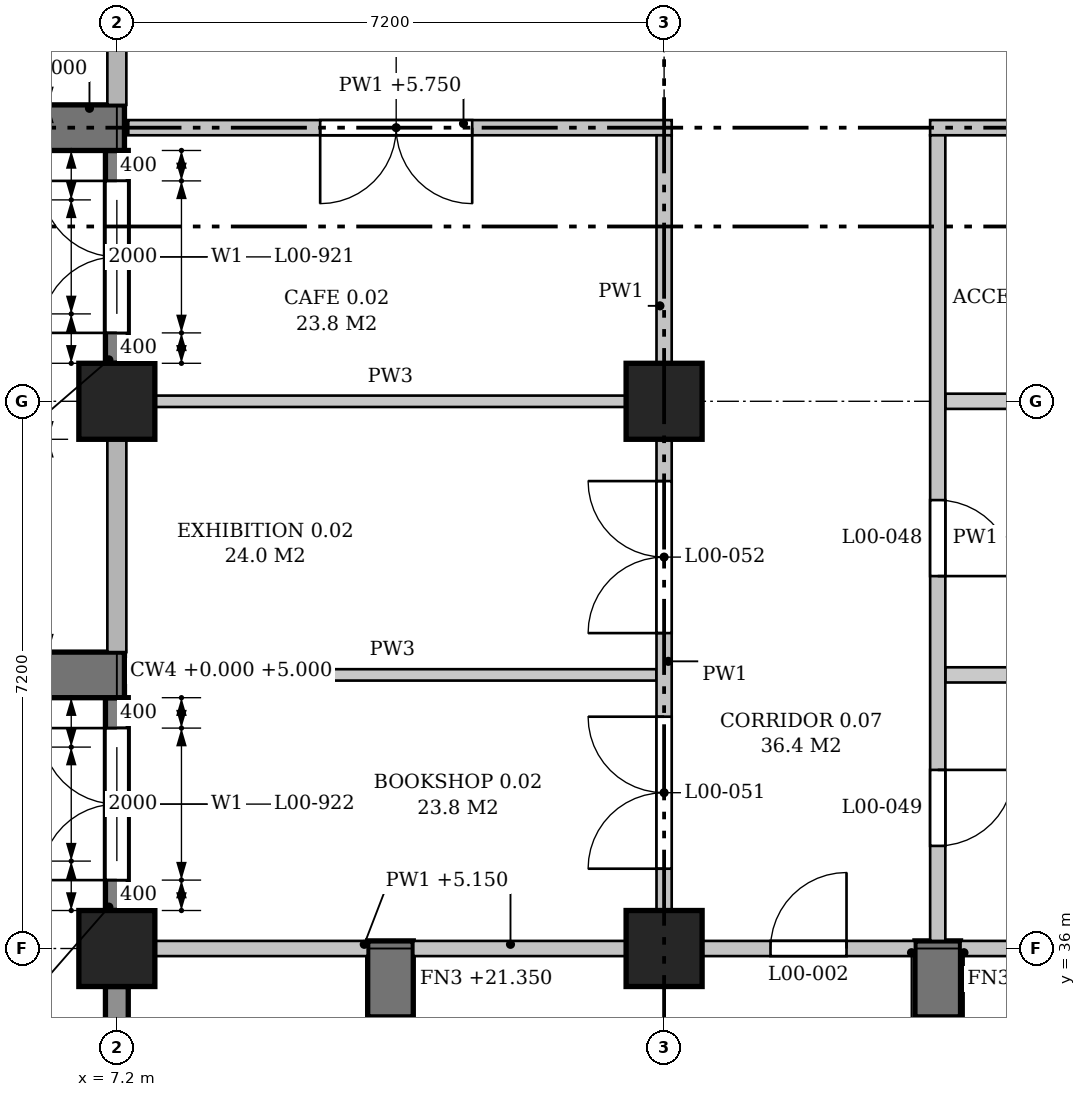
"""IFC4 building model, lengths in metres.
Left out: names, types, materials, properties, quantities, classifications, styles, units other than length and angle.
Written with IfcOpenShell. Run it as: python <this file> out.ifc"""

import sys

from ifc_helpers import new_model, si_unit, direction, frame, frame_2d, origin, origin_2d, place, context, subcontext, project, spatial, polyline, rectangle, outline, extrude, element, fill, save


model = new_model("IFC4")
c1 = context("Model", 3, precision=1e-05, world=origin(), true_north=direction((0.0, 1.0)))
c2 = subcontext(c1, "Body", "Model", "MODEL_VIEW")
j1 = project(units=[si_unit("LENGTHUNIT", "METRE"), si_unit("PLANEANGLEUNIT", "RADIAN")], contexts=[c1])
p1 = place(None, origin())
s1 = spatial("IfcSite", under=j1, at=p1, CompositionType="ELEMENT")
p2 = place(p1, origin())
s2 = spatial("IfcBuilding", under=s1, at=p2, CompositionType="ELEMENT")
p3 = place(p2, origin())
s3 = spatial("IfcBuildingStorey", under=s2, at=p3, CompositionType="ELEMENT", Elevation=0.0)
for number, where, z_axis, x_axis in (
    (1, (7.2, 36.0, 0.0), (0.0, 0.0, 1.0), (1.0, 0.0, 0.0)),
    (2, (7.2, 43.2, 0.0), (0.0, 0.0, 1.0), (1.0, 0.0, 0.0)),
    (3, (14.4, 36.0, 0.0), (0.0, 0.0, 1.0), (1.0, 0.0, 0.0)),
    (4, (14.4, 43.2, 0.0), (0.0, 0.0, 1.0), (1.0, 0.0, 0.0)),
):
    element("IfcColumn", number, at=place(p3, frame(where, z_axis=z_axis, x_axis=x_axis)), inside=s3, PredefinedType="COLUMN", context=c2, shape_type="SweptSolid", body=[
        extrude(rectangle(XDim=1.0, YDim=1.0, at=origin_2d()), origin(), (0.0, 0.0, 1.0), 6.0),
    ])
p4 = place(p3, frame((7.2, 36.5, 0.0), z_axis=(0.0, 0.0, 1.0), x_axis=(0.0, 1.0, 0.0)))
e5 = element("IfcWall", 5, at=p4, inside=s3, PredefinedType="STANDARD", context=c2, shape_type="SweptSolid", body=[
    extrude(rectangle(XDim=2.8, YDim=0.3, at=frame_2d((1.4, 0.0))), origin(), (0.0, 0.0, 1.0), 5.0),
])
p5 = place(p4, frame((0.4, 0.0, 0.0)))
e6 = element("IfcOpeningElement", 6, at=p5, cuts=e5, PredefinedType="OPENING", context=c2, shape_type="SweptSolid", body=[
    extrude(outline(polyline([(0.0, 0.0), (2.0, 0.0), (2.0, 1.9), (1.0, 2.9), (0.0, 1.9), (0.0, 0.0)])), frame((0.0, 0.16, 0.0), z_axis=(0.0, -1.0, 0.0), x_axis=(1.0, 0.0, 0.0)), (0.0, 0.0, 1.0), 0.32),
])
p6 = place(p4, frame((0.65, 0.0, 3.15)))
e7 = element("IfcOpeningElement", 7, at=p6, cuts=e5, PredefinedType="OPENING", context=c2, shape_type="SweptSolid", body=[
    extrude(outline(polyline([(0.0, 0.0), (1.5, 0.0), (1.5, 1.05), (0.75, 1.8), (0.0, 1.05), (0.0, 0.0)])), frame((0.0, 0.16, 0.0), z_axis=(0.0, -1.0, 0.0), x_axis=(1.0, 0.0, 0.0)), (0.0, 0.0, 1.0), 0.32),
])
p7 = place(p3, frame((7.2, 43.7, 0.0), z_axis=(0.0, 0.0, 1.0), x_axis=(0.0, 1.0, 0.0)))
e8 = element("IfcWall", 8, at=p7, inside=s3, PredefinedType="STANDARD", context=c2, shape_type="SweptSolid", body=[
    extrude(rectangle(XDim=2.8, YDim=0.3, at=frame_2d((1.4, 0.0))), origin(), (0.0, 0.0, 1.0), 5.0),
])
p8 = place(p7, frame((0.4, 0.0, 0.0)))
e9 = element("IfcOpeningElement", 9, at=p8, cuts=e8, PredefinedType="OPENING", context=c2, shape_type="SweptSolid", body=[
    extrude(outline(polyline([(0.0, 0.0), (2.0, 0.0), (2.0, 1.9), (1.0, 2.9), (0.0, 1.9), (0.0, 0.0)])), frame((0.0, 0.16, 0.0), z_axis=(0.0, -1.0, 0.0), x_axis=(1.0, 0.0, 0.0)), (0.0, 0.0, 1.0), 0.32),
])
p9 = place(p7, frame((0.65, 0.0, 3.15)))
e10 = element("IfcOpeningElement", 10, at=p9, cuts=e8, PredefinedType="OPENING", context=c2, shape_type="SweptSolid", body=[
    extrude(outline(polyline([(0.0, 0.0), (1.5, 0.0), (1.5, 1.05), (0.75, 1.8), (0.0, 1.05), (0.0, 0.0)])), frame((0.0, 0.16, 0.0), z_axis=(0.0, -1.0, 0.0), x_axis=(1.0, 0.0, 0.0)), (0.0, 0.0, 1.0), 0.32),
])
p10 = place(p3, frame((7.2, 32.7, 0.0), z_axis=(0.0, 0.0, 1.0), x_axis=(0.0, 1.0, 0.0)))
e11 = element("IfcWall", 11, at=p10, inside=s3, PredefinedType="SOLIDWALL", context=c2, shape_type="SweptSolid", body=[
    extrude(rectangle(XDim=2.8, YDim=0.3, at=frame_2d((1.4, 0.0))), origin(), (0.0, 0.0, 1.0), 5.75),
])
for number, where, z_axis, x_axis in (
    (12, (10.8, 36.1, 0.0), (0.0, 0.0, 1.0), (0.0, -1.0, 0.0)),
    (13, (18.0, 36.1, 0.0), (0.0, 0.0, 1.0), (0.0, -1.0, 0.0)),
):
    element("IfcWall", number, at=place(p3, frame(where, z_axis=z_axis, x_axis=x_axis)), inside=s3, PredefinedType="POLYGONAL", context=c2, shape_type="SweptSolid", body=[
        extrude(outline(polyline([(1.0, 0.0), (1.0, 20.975), (0.75, 21.35), (0.35, 21.35), (0.35, 20.75), (0.0, 20.75), (0.0, 16.8), (0.35, 16.8), (0.35, 15.95), (0.0, 15.95), (0.0, 11.4), (0.35, 11.4), (0.35, 10.55), (0.0, 10.55), (0.0, 6.0), (0.35, 6.0), (0.35, 0.0), (1.0, 0.0)])), frame((0.0, 0.3, 0.0), z_axis=(0.0, -1.0, 0.0), x_axis=(1.0, 0.0, 0.0)), (0.0, 0.0, 1.0), 0.6),
    ])
for number, where, z_axis, x_axis in (
    (14, (7.3, 39.6, 0.0), (0.0, 0.0, 1.0), (-1.0, 0.0, 0.0)),
    (15, (7.3, 46.8, 0.0), (0.0, 0.0, 1.0), (-1.0, 0.0, 0.0)),
):
    element("IfcWall", number, at=place(p3, frame(where, z_axis=z_axis, x_axis=x_axis)), inside=s3, PredefinedType="POLYGONAL", context=c2, shape_type="SweptSolid", body=[
        extrude(outline(polyline([(1.0, 0.0), (1.0, 5.25), (0.5, 6.0), (0.35, 6.0), (0.35, 5.0), (0.0, 5.0), (0.0, 0.0), (1.0, 0.0)])), frame((0.0, 0.3, 0.0), z_axis=(0.0, -1.0, 0.0), x_axis=(1.0, 0.0, 0.0)), (0.0, 0.0, 1.0), 0.6),
    ])
p11 = place(p3, frame((7.7, 36.0, 0.0), z_axis=(0.0, 0.0, 1.0), x_axis=(1.0, 0.0, 0.0)))
e16 = element("IfcWall", 16, at=p11, inside=s3, PredefinedType="PARTITIONING", context=c2, shape_type="SweptSolid", body=[
    extrude(rectangle(XDim=2.8, YDim=0.2, at=frame_2d((1.4, 0.0))), origin(), (0.0, 0.0, 1.0), 5.15),
])
p12 = place(p3, frame((11.1, 36.0, 0.0), z_axis=(0.0, 0.0, 1.0), x_axis=(1.0, 0.0, 0.0)))
e17 = element("IfcWall", 17, at=p12, inside=s3, PredefinedType="PARTITIONING", context=c2, shape_type="SweptSolid", body=[
    extrude(rectangle(XDim=2.8, YDim=0.2, at=frame_2d((1.4, 0.0))), origin(), (0.0, 0.0, 1.0), 5.15),
])
p13 = place(p3, frame((14.9, 36.0, 0.0), z_axis=(0.0, 0.0, 1.0), x_axis=(1.0, 0.0, 0.0)))
e18 = element("IfcWall", 18, at=p13, inside=s3, PredefinedType="PARTITIONING", context=c2, shape_type="SweptSolid", body=[
    extrude(rectangle(XDim=2.8, YDim=0.2, at=frame_2d((1.4, 0.0))), origin(), (0.0, 0.0, 1.0), 5.15),
])
p14 = place(p13, frame((0.9, 0.0, 0.0)))
e19 = element("IfcOpeningElement", 19, at=p14, cuts=e18, PredefinedType="OPENING", context=c2, shape_type="SweptSolid", body=[
    extrude(rectangle(XDim=1.0, YDim=2.1, at=frame_2d((0.5, 1.05))), frame((0.0, 0.11, 0.0), z_axis=(0.0, -1.0, 0.0), x_axis=(1.0, 0.0, 0.0)), (0.0, 0.0, 1.0), 0.22),
])
p15 = place(p3, frame((18.3, 36.0, 0.0), z_axis=(0.0, 0.0, 1.0), x_axis=(1.0, 0.0, 0.0)))
e20 = element("IfcWall", 20, at=p15, inside=s3, PredefinedType="PARTITIONING", context=c2, shape_type="SweptSolid", body=[
    extrude(rectangle(XDim=2.8, YDim=0.2, at=frame_2d((1.4, 0.0))), origin(), (0.0, 0.0, 1.0), 5.15),
])
p16 = place(p3, frame((7.35, 39.6, 0.0), z_axis=(0.0, 0.0, 1.0), x_axis=(1.0, 0.0, 0.0)))
e21 = element("IfcWall", 21, at=p16, inside=s3, PredefinedType="PARTITIONING", context=c2, shape_type="SweptSolid", body=[
    extrude(rectangle(XDim=6.95, YDim=0.15, at=frame_2d((3.475, 0.0))), origin(), (0.0, 0.0, 1.0), 5.0),
])
p17 = place(p3, frame((18.1, 39.6, 0.0), z_axis=(0.0, 0.0, 1.0), x_axis=(1.0, 0.0, 0.0)))
e22 = element("IfcWall", 22, at=p17, inside=s3, PredefinedType="PARTITIONING", context=c2, shape_type="SweptSolid", body=[
    extrude(outline(polyline([(0.0, 0.0), (3.4, 0.0), (3.4, 5.0), (3.25, 5.0), (3.25, 5.75), (0.0, 5.75), (0.0, 0.0)])), frame((0.0, 0.1, 0.0), z_axis=(0.0, -1.0, 0.0), x_axis=(1.0, 0.0, 0.0)), (0.0, 0.0, 1.0), 0.2),
])
p18 = place(p3, frame((7.7, 43.2, 0.0), z_axis=(0.0, 0.0, 1.0), x_axis=(1.0, 0.0, 0.0)))
e23 = element("IfcWall", 23, at=p18, inside=s3, PredefinedType="PARTITIONING", context=c2, shape_type="SweptSolid", body=[
    extrude(rectangle(XDim=6.2, YDim=0.15, at=frame_2d((3.1, 0.0))), origin(), (0.0, 0.0, 1.0), 5.0),
])
p19 = place(p3, frame((18.1, 43.2, 0.0), z_axis=(0.0, 0.0, 1.0), x_axis=(1.0, 0.0, 0.0)))
e24 = element("IfcWall", 24, at=p19, inside=s3, PredefinedType="PARTITIONING", context=c2, shape_type="SweptSolid", body=[
    extrude(rectangle(XDim=3.0, YDim=0.2, at=frame_2d((1.5, 0.0))), origin(), (0.0, 0.0, 1.0), 5.0),
])
p20 = place(p3, frame((7.35, 46.8, 0.0), z_axis=(0.0, 0.0, 1.0), x_axis=(1.0, 0.0, 0.0)))
e25 = element("IfcWall", 25, at=p20, inside=s3, PredefinedType="PARTITIONING", context=c2, shape_type="SweptSolid", body=[
    extrude(outline(polyline([(0.0, 0.0), (7.15, 0.0), (7.15, 5.0), (6.8, 5.0), (6.8, 5.75), (0.1, 5.75), (0.1, 5.0), (0.0, 5.0), (0.0, 0.0)])), frame((0.0, 0.1, 0.0), z_axis=(0.0, -1.0, 0.0), x_axis=(1.0, 0.0, 0.0)), (0.0, 0.0, 1.0), 0.2),
])
p21 = place(p20, frame((2.525, 0.0, 0.0)))
e26 = element("IfcOpeningElement", 26, at=p21, cuts=e25, PredefinedType="OPENING", context=c2, shape_type="SweptSolid", body=[
    extrude(rectangle(XDim=2.0, YDim=2.1, at=frame_2d((1.0, 1.05))), frame((0.0, 0.11, 0.0), z_axis=(0.0, -1.0, 0.0), x_axis=(1.0, 0.0, 0.0)), (0.0, 0.0, 1.0), 0.22),
])
p22 = place(p3, frame((17.9, 46.8, 0.0), z_axis=(0.0, 0.0, 1.0), x_axis=(1.0, 0.0, 0.0)))
e27 = element("IfcWall", 27, at=p22, inside=s3, PredefinedType="PARTITIONING", context=c2, shape_type="SweptSolid", body=[
    extrude(outline(polyline([(0.0, 0.0), (3.575, 0.0), (3.575, 5.0), (3.45, 5.0), (3.45, 5.75), (0.0, 5.75), (0.0, 0.0)])), frame((0.0, 0.1, 0.0), z_axis=(0.0, -1.0, 0.0), x_axis=(1.0, 0.0, 0.0)), (0.0, 0.0, 1.0), 0.2),
])
p23 = place(p22, frame((1.338, 0.0, 0.0)))
e28 = element("IfcOpeningElement", 28, at=p23, cuts=e27, PredefinedType="OPENING", context=c2, shape_type="SweptSolid", body=[
    extrude(rectangle(XDim=1.0, YDim=2.1, at=frame_2d((0.5, 1.05))), frame((0.0, 0.11, 0.0), z_axis=(0.0, -1.0, 0.0), x_axis=(1.0, 0.0, 0.0)), (0.0, 0.0, 1.0), 0.22),
])
p24 = place(p3, frame((14.4, 36.5, 0.0), z_axis=(0.0, 0.0, 1.0), x_axis=(0.0, 1.0, 0.0)))
e29 = element("IfcWall", 29, at=p24, inside=s3, PredefinedType="PARTITIONING", context=c2, shape_type="SweptSolid", body=[
    extrude(rectangle(XDim=6.2, YDim=0.2, at=frame_2d((3.1, 0.0))), origin(), (0.0, 0.0, 1.0), 5.0),
])
p25 = place(p24, frame((0.55, 0.0, 0.0)))
e30 = element("IfcOpeningElement", 30, at=p25, cuts=e29, PredefinedType="OPENING", context=c2, shape_type="SweptSolid", body=[
    extrude(rectangle(XDim=2.0, YDim=2.1, at=frame_2d((1.0, 1.05))), frame((0.0, 0.11, 0.0), z_axis=(0.0, -1.0, 0.0), x_axis=(1.0, 0.0, 0.0)), (0.0, 0.0, 1.0), 0.22),
])
p26 = place(p24, frame((3.65, 0.0, 0.0)))
e31 = element("IfcOpeningElement", 31, at=p26, cuts=e29, PredefinedType="OPENING", context=c2, shape_type="SweptSolid", body=[
    extrude(rectangle(XDim=2.0, YDim=2.1, at=frame_2d((1.0, 1.05))), frame((0.0, 0.11, 0.0), z_axis=(0.0, -1.0, 0.0), x_axis=(1.0, 0.0, 0.0)), (0.0, 0.0, 1.0), 0.22),
])
p27 = place(p3, frame((14.4, 43.7, 0.0), z_axis=(0.0, 0.0, 1.0), x_axis=(0.0, 1.0, 0.0)))
e32 = element("IfcWall", 32, at=p27, inside=s3, PredefinedType="PARTITIONING", context=c2, shape_type="SweptSolid", body=[
    extrude(rectangle(XDim=3.0, YDim=0.2, at=frame_2d((1.5, 0.0))), origin(), (0.0, 0.0, 1.0), 5.0),
])
p28 = place(p3, frame((18.0, 36.1, 0.0), z_axis=(0.0, 0.0, 1.0), x_axis=(0.0, 1.0, 0.0)))
e33 = element("IfcWall", 33, at=p28, inside=s3, PredefinedType="PARTITIONING", context=c2, shape_type="SweptSolid", body=[
    extrude(outline(polyline([(0.0, 0.0), (10.6, 0.0), (10.6, 5.75), (7.35, 5.75), (7.35, 5.0), (6.85, 5.0), (6.85, 5.75), (0.15, 5.75), (0.15, 5.15), (0.0, 5.15), (0.0, 0.0)])), frame((0.0, 0.1, 0.0), z_axis=(0.0, -1.0, 0.0), x_axis=(1.0, 0.0, 0.0)), (0.0, 0.0, 1.0), 0.2),
])
p29 = place(p28, frame((4.8, 0.0, 0.0)))
e34 = element("IfcOpeningElement", 34, at=p29, cuts=e33, PredefinedType="OPENING", context=c2, shape_type="SweptSolid", body=[
    extrude(rectangle(XDim=1.0, YDim=2.1, at=frame_2d((0.5, 1.05))), frame((0.0, 0.11, 0.0), z_axis=(0.0, -1.0, 0.0), x_axis=(1.0, 0.0, 0.0)), (0.0, 0.0, 1.0), 0.22),
])
p30 = place(p28, frame((1.25, 0.0, 0.0)))
e35 = element("IfcOpeningElement", 35, at=p30, cuts=e33, PredefinedType="OPENING", context=c2, shape_type="SweptSolid", body=[
    extrude(rectangle(XDim=1.0, YDim=2.1, at=frame_2d((0.5, 1.05))), frame((0.0, 0.11, 0.0), z_axis=(0.0, -1.0, 0.0), x_axis=(1.0, 0.0, 0.0)), (0.0, 0.0, 1.0), 0.22),
])
p31 = place(p8, origin())
e36 = element("IfcDoor", 36, at=p31, inside=s3, OperationType="DOUBLE_DOOR_SINGLE_SWING", PredefinedType="DOOR", context=c2, shape_type="SweptSolid", body=[
    extrude(outline(polyline([(0.0, 0.0), (2.0, 0.0), (2.0, 1.9), (1.0, 2.9), (0.0, 1.9), (0.0, 0.0)])), frame((0.0, 0.025, 0.0), z_axis=(0.0, -1.0, 0.0), x_axis=(1.0, 0.0, 0.0)), (0.0, 0.0, 1.0), 0.05),
])
fill(e9, e36)
p32 = place(p9, origin())
e37 = element("IfcWindow", 37, at=p32, inside=s3, PartitioningType="SINGLE_PANEL", PredefinedType="WINDOW", context=c2, shape_type="SweptSolid", body=[
    extrude(outline(polyline([(0.0, 0.0), (1.5, 0.0), (1.5, 1.05), (0.75, 1.8), (0.0, 1.05), (0.0, 0.0)])), frame((0.0, 0.03, 0.0), z_axis=(0.0, -1.0, 0.0), x_axis=(1.0, 0.0, 0.0)), (0.0, 0.0, 1.0), 0.06),
])
fill(e10, e37)
p33 = place(p5, origin())
e38 = element("IfcDoor", 38, at=p33, inside=s3, OperationType="DOUBLE_DOOR_SINGLE_SWING", PredefinedType="DOOR", context=c2, shape_type="SweptSolid", body=[
    extrude(outline(polyline([(0.0, 0.0), (2.0, 0.0), (2.0, 1.9), (1.0, 2.9), (0.0, 1.9), (0.0, 0.0)])), frame((0.0, 0.025, 0.0), z_axis=(0.0, -1.0, 0.0), x_axis=(1.0, 0.0, 0.0)), (0.0, 0.0, 1.0), 0.05),
])
fill(e6, e38)
p34 = place(p6, origin())
e39 = element("IfcWindow", 39, at=p34, inside=s3, PartitioningType="SINGLE_PANEL", PredefinedType="WINDOW", context=c2, shape_type="SweptSolid", body=[
    extrude(outline(polyline([(0.0, 0.0), (1.5, 0.0), (1.5, 1.05), (0.75, 1.8), (0.0, 1.05), (0.0, 0.0)])), frame((0.0, 0.03, 0.0), z_axis=(0.0, -1.0, 0.0), x_axis=(1.0, 0.0, 0.0)), (0.0, 0.0, 1.0), 0.06),
])
fill(e7, e39)
p35 = place(p14, origin())
e40 = element("IfcDoor", 40, at=p35, inside=s3, OperationType="SINGLE_SWING_RIGHT", PredefinedType="DOOR", context=c2, shape_type="SweptSolid", body=[
    extrude(rectangle(XDim=1.0, YDim=2.1, at=frame_2d((0.5, 1.05))), frame((0.0, 0.025, 0.0), z_axis=(0.0, -1.0, 0.0), x_axis=(1.0, 0.0, 0.0)), (0.0, 0.0, 1.0), 0.05),
])
fill(e19, e40)
p36 = place(p29, frame((1.0, 0.0, 0.0), z_axis=(0.0, 0.0, 1.0), x_axis=(-1.0, 0.0, 0.0)))
e41 = element("IfcDoor", 41, at=p36, inside=s3, OperationType="SINGLE_SWING_RIGHT", PredefinedType="DOOR", context=c2, shape_type="SweptSolid", body=[
    extrude(rectangle(XDim=1.0, YDim=2.1, at=frame_2d((0.5, 1.05))), frame((0.0, 0.025, 0.0), z_axis=(0.0, -1.0, 0.0), x_axis=(1.0, 0.0, 0.0)), (0.0, 0.0, 1.0), 0.05),
])
fill(e34, e41)
p37 = place(p30, frame((1.0, 0.0, 0.0), z_axis=(0.0, 0.0, 1.0), x_axis=(-1.0, 0.0, 0.0)))
e42 = element("IfcDoor", 42, at=p37, inside=s3, OperationType="SINGLE_SWING_LEFT", PredefinedType="DOOR", context=c2, shape_type="SweptSolid", body=[
    extrude(rectangle(XDim=1.0, YDim=2.1, at=frame_2d((0.5, 1.05))), frame((0.0, 0.025, 0.0), z_axis=(0.0, -1.0, 0.0), x_axis=(1.0, 0.0, 0.0)), (0.0, 0.0, 1.0), 0.05),
])
fill(e35, e42)
p38 = place(p21, origin())
e43 = element("IfcDoor", 43, at=p38, inside=s3, OperationType="DOUBLE_DOOR_SINGLE_SWING", PredefinedType="DOOR", context=c2, shape_type="SweptSolid", body=[
    extrude(rectangle(XDim=2.0, YDim=2.1, at=frame_2d((1.0, 1.05))), frame((0.0, 0.025, 0.0), z_axis=(0.0, -1.0, 0.0), x_axis=(1.0, 0.0, 0.0)), (0.0, 0.0, 1.0), 0.05),
])
fill(e26, e43)
p39 = place(p25, origin())
e44 = element("IfcDoor", 44, at=p39, inside=s3, OperationType="DOUBLE_DOOR_SINGLE_SWING", PredefinedType="DOOR", context=c2, shape_type="SweptSolid", body=[
    extrude(rectangle(XDim=2.0, YDim=2.1, at=frame_2d((1.0, 1.05))), frame((0.0, 0.025, 0.0), z_axis=(0.0, -1.0, 0.0), x_axis=(1.0, 0.0, 0.0)), (0.0, 0.0, 1.0), 0.05),
])
fill(e30, e44)
p40 = place(p26, origin())
e45 = element("IfcDoor", 45, at=p40, inside=s3, OperationType="DOUBLE_DOOR_SINGLE_SWING", PredefinedType="DOOR", context=c2, shape_type="SweptSolid", body=[
    extrude(rectangle(XDim=2.0, YDim=2.1, at=frame_2d((1.0, 1.05))), frame((0.0, 0.025, 0.0), z_axis=(0.0, -1.0, 0.0), x_axis=(1.0, 0.0, 0.0)), (0.0, 0.0, 1.0), 0.05),
])
fill(e31, e45)
save(model, sys.argv[1])
